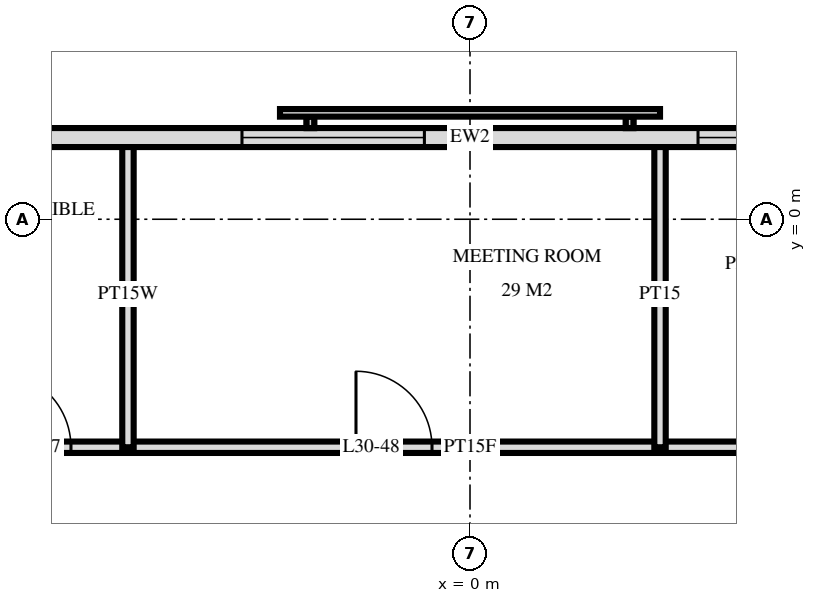
"""IFC4 building model, lengths in metres.
Left out: names, types, materials, properties, quantities, classifications, styles, units other than length and angle.
Written with IfcOpenShell. Run it as: python <this file> out.ifc"""

import sys

from ifc_helpers import new_model, si_unit, direction, frame, frame_2d, origin, place, context, subcontext, project, spatial, rectangle, extrude, element, fill, save


model = new_model("IFC4")
c1 = context("Model", 3, precision=1e-05, world=origin(), true_north=direction((0.0, 1.0)))
c2 = subcontext(c1, "Body", "Model", "MODEL_VIEW")
j1 = project(units=[si_unit("LENGTHUNIT", "METRE"), si_unit("PLANEANGLEUNIT", "RADIAN")], contexts=[c1])
p1 = place(None, origin())
s1 = spatial("IfcSite", under=j1, at=p1, CompositionType="ELEMENT")
p2 = place(p1, origin())
s2 = spatial("IfcBuilding", under=s1, at=p2, CompositionType="ELEMENT")
p3 = place(p2, frame((0.0, 0.0, 120.0)))
s3 = spatial("IfcBuildingStorey", under=s2, at=p3, CompositionType="ELEMENT", Elevation=120.0)
p4 = place(p3, frame((23.675, 1.075, 0.0), z_axis=(0.0, 0.0, 1.0), x_axis=(-1.0, 0.0, 0.0)))
e1 = element("IfcWall", 1, at=p4, inside=s3, PredefinedType="SOLIDWALL", context=c2, shape_type="SweptSolid", body=[
    extrude(rectangle(XDim=47.351, YDim=0.25, at=frame_2d((23.675, 0.0))), origin(), (0.0, 0.0, 1.0), 3.32),
])
p5 = place(p4, frame((15.275, 0.0, 0.3)))
e2 = element("IfcOpeningElement", 2, at=p5, cuts=e1, PredefinedType="OPENING", context=c2, shape_type="SweptSolid", body=[
    extrude(rectangle(XDim=2.4, YDim=2.1, at=frame_2d((1.2, 1.05))), frame((0.0, 0.135, 0.0), z_axis=(0.0, -1.0, 0.0), x_axis=(1.0, 0.0, 0.0)), (0.0, 0.0, 1.0), 0.27),
])
p6 = place(p4, frame((18.275, 0.0, 0.3)))
e3 = element("IfcOpeningElement", 3, at=p6, cuts=e1, PredefinedType="OPENING", context=c2, shape_type="SweptSolid", body=[
    extrude(rectangle(XDim=2.4, YDim=2.1, at=frame_2d((1.2, 1.05))), frame((0.0, 0.135, 0.0), z_axis=(0.0, -1.0, 0.0), x_axis=(1.0, 0.0, 0.0)), (0.0, 0.0, 1.0), 0.27),
])
p7 = place(p4, frame((24.275, 0.0, 0.3)))
e4 = element("IfcOpeningElement", 4, at=p7, cuts=e1, PredefinedType="OPENING", context=c2, shape_type="SweptSolid", body=[
    extrude(rectangle(XDim=2.4, YDim=2.1, at=frame_2d((1.2, 1.05))), frame((0.0, 0.135, 0.0), z_axis=(0.0, -1.0, 0.0), x_axis=(1.0, 0.0, 0.0)), (0.0, 0.0, 1.0), 0.27),
])
p8 = place(p3, frame((2.5, -3.0, 0.0), z_axis=(0.0, 0.0, 1.0), x_axis=(0.0, 1.0, 0.0)))
e5 = element("IfcWall", 5, at=p8, inside=s3, PredefinedType="PARTITIONING", context=c2, shape_type="SweptSolid", body=[
    extrude(rectangle(XDim=4.02, YDim=0.15, at=frame_2d((2.01, 0.0))), origin(), (0.0, 0.0, 1.0), 3.32),
])
p9 = place(p3, frame((-4.5, -3.0, 0.0), z_axis=(0.0, 0.0, 1.0), x_axis=(0.0, 1.0, 0.0)))
e6 = element("IfcWall", 6, at=p9, inside=s3, PredefinedType="PLUMBINGWALL", context=c2, shape_type="SweptSolid", body=[
    extrude(rectangle(XDim=4.02, YDim=0.15, at=frame_2d((2.01, 0.0))), origin(), (0.0, 0.0, 1.0), 3.32),
])
p10 = place(p3, frame((-9.95, -3.0, 0.0), z_axis=(0.0, 0.0, 1.0), x_axis=(1.0, 0.0, 0.0)))
e7 = element("IfcWall", 7, at=p10, inside=s3, PredefinedType="PARTITIONING", context=c2, shape_type="SweptSolid", body=[
    extrude(rectangle(XDim=19.9, YDim=0.15, at=frame_2d((9.95, 0.0))), origin(), (0.0, 0.0, 1.0), 3.32),
])
p11 = place(p10, frame((0.95, 0.0, 0.0)))
e8 = element("IfcOpeningElement", 8, at=p11, cuts=e7, PredefinedType="OPENING", context=c2, shape_type="SweptSolid", body=[
    extrude(rectangle(XDim=1.0, YDim=2.1, at=frame_2d((0.5, 1.05))), frame((0.0, 0.085, 0.0), z_axis=(0.0, -1.0, 0.0), x_axis=(1.0, 0.0, 0.0)), (0.0, 0.0, 1.0), 0.17),
])
p12 = place(p10, frame((3.7, 0.0, 0.0)))
e9 = element("IfcOpeningElement", 9, at=p12, cuts=e7, PredefinedType="OPENING", context=c2, shape_type="SweptSolid", body=[
    extrude(rectangle(XDim=1.0, YDim=2.1, at=frame_2d((0.5, 1.05))), frame((0.0, 0.085, 0.0), z_axis=(0.0, -1.0, 0.0), x_axis=(1.0, 0.0, 0.0)), (0.0, 0.0, 1.0), 0.17),
])
p13 = place(p10, frame((8.45, 0.0, 0.0)))
e10 = element("IfcOpeningElement", 10, at=p13, cuts=e7, PredefinedType="OPENING", context=c2, shape_type="SweptSolid", body=[
    extrude(rectangle(XDim=1.0, YDim=2.1, at=frame_2d((0.5, 1.05))), frame((0.0, 0.085, 0.0), z_axis=(0.0, -1.0, 0.0), x_axis=(1.0, 0.0, 0.0)), (0.0, 0.0, 1.0), 0.17),
])
p14 = place(p10, frame((15.7, 0.0, 0.0)))
e11 = element("IfcOpeningElement", 11, at=p14, cuts=e7, PredefinedType="OPENING", context=c2, shape_type="SweptSolid", body=[
    extrude(rectangle(XDim=1.0, YDim=2.1, at=frame_2d((0.5, 1.05))), frame((0.0, 0.085, 0.0), z_axis=(0.0, -1.0, 0.0), x_axis=(1.0, 0.0, 0.0)), (0.0, 0.0, 1.0), 0.17),
])
p15 = place(p6, origin())
e12 = element("IfcWindow", 12, at=p15, inside=s3, PartitioningType="SINGLE_PANEL", PredefinedType="WINDOW", context=c2, shape_type="SweptSolid", body=[
    extrude(rectangle(XDim=2.4, YDim=2.1, at=frame_2d((1.2, 1.05))), frame((0.0, 0.03, 0.0), z_axis=(0.0, -1.0, 0.0), x_axis=(1.0, 0.0, 0.0)), (0.0, 0.0, 1.0), 0.06),
])
fill(e3, e12)
p16 = place(p7, origin())
e13 = element("IfcWindow", 13, at=p16, inside=s3, PartitioningType="SINGLE_PANEL", PredefinedType="WINDOW", context=c2, shape_type="SweptSolid", body=[
    extrude(rectangle(XDim=2.4, YDim=2.1, at=frame_2d((1.2, 1.05))), frame((0.0, 0.03, 0.0), z_axis=(0.0, -1.0, 0.0), x_axis=(1.0, 0.0, 0.0)), (0.0, 0.0, 1.0), 0.06),
])
fill(e4, e13)
p17 = place(p12, origin())
e14 = element("IfcDoor", 14, at=p17, inside=s3, OperationType="SINGLE_SWING_RIGHT", PredefinedType="DOOR", context=c2, shape_type="SweptSolid", body=[
    extrude(rectangle(XDim=1.0, YDim=2.1, at=frame_2d((0.5, 1.05))), frame((0.0, 0.025, 0.0), z_axis=(0.0, -1.0, 0.0), x_axis=(1.0, 0.0, 0.0)), (0.0, 0.0, 1.0), 0.05),
])
fill(e9, e14)
p18 = place(p13, origin())
e15 = element("IfcDoor", 15, at=p18, inside=s3, OperationType="SINGLE_SWING_RIGHT", PredefinedType="DOOR", context=c2, shape_type="SweptSolid", body=[
    extrude(rectangle(XDim=1.0, YDim=2.1, at=frame_2d((0.5, 1.05))), frame((0.0, 0.025, 0.0), z_axis=(0.0, -1.0, 0.0), x_axis=(1.0, 0.0, 0.0)), (0.0, 0.0, 1.0), 0.05),
])
fill(e10, e15)
save(model, sys.argv[1])
